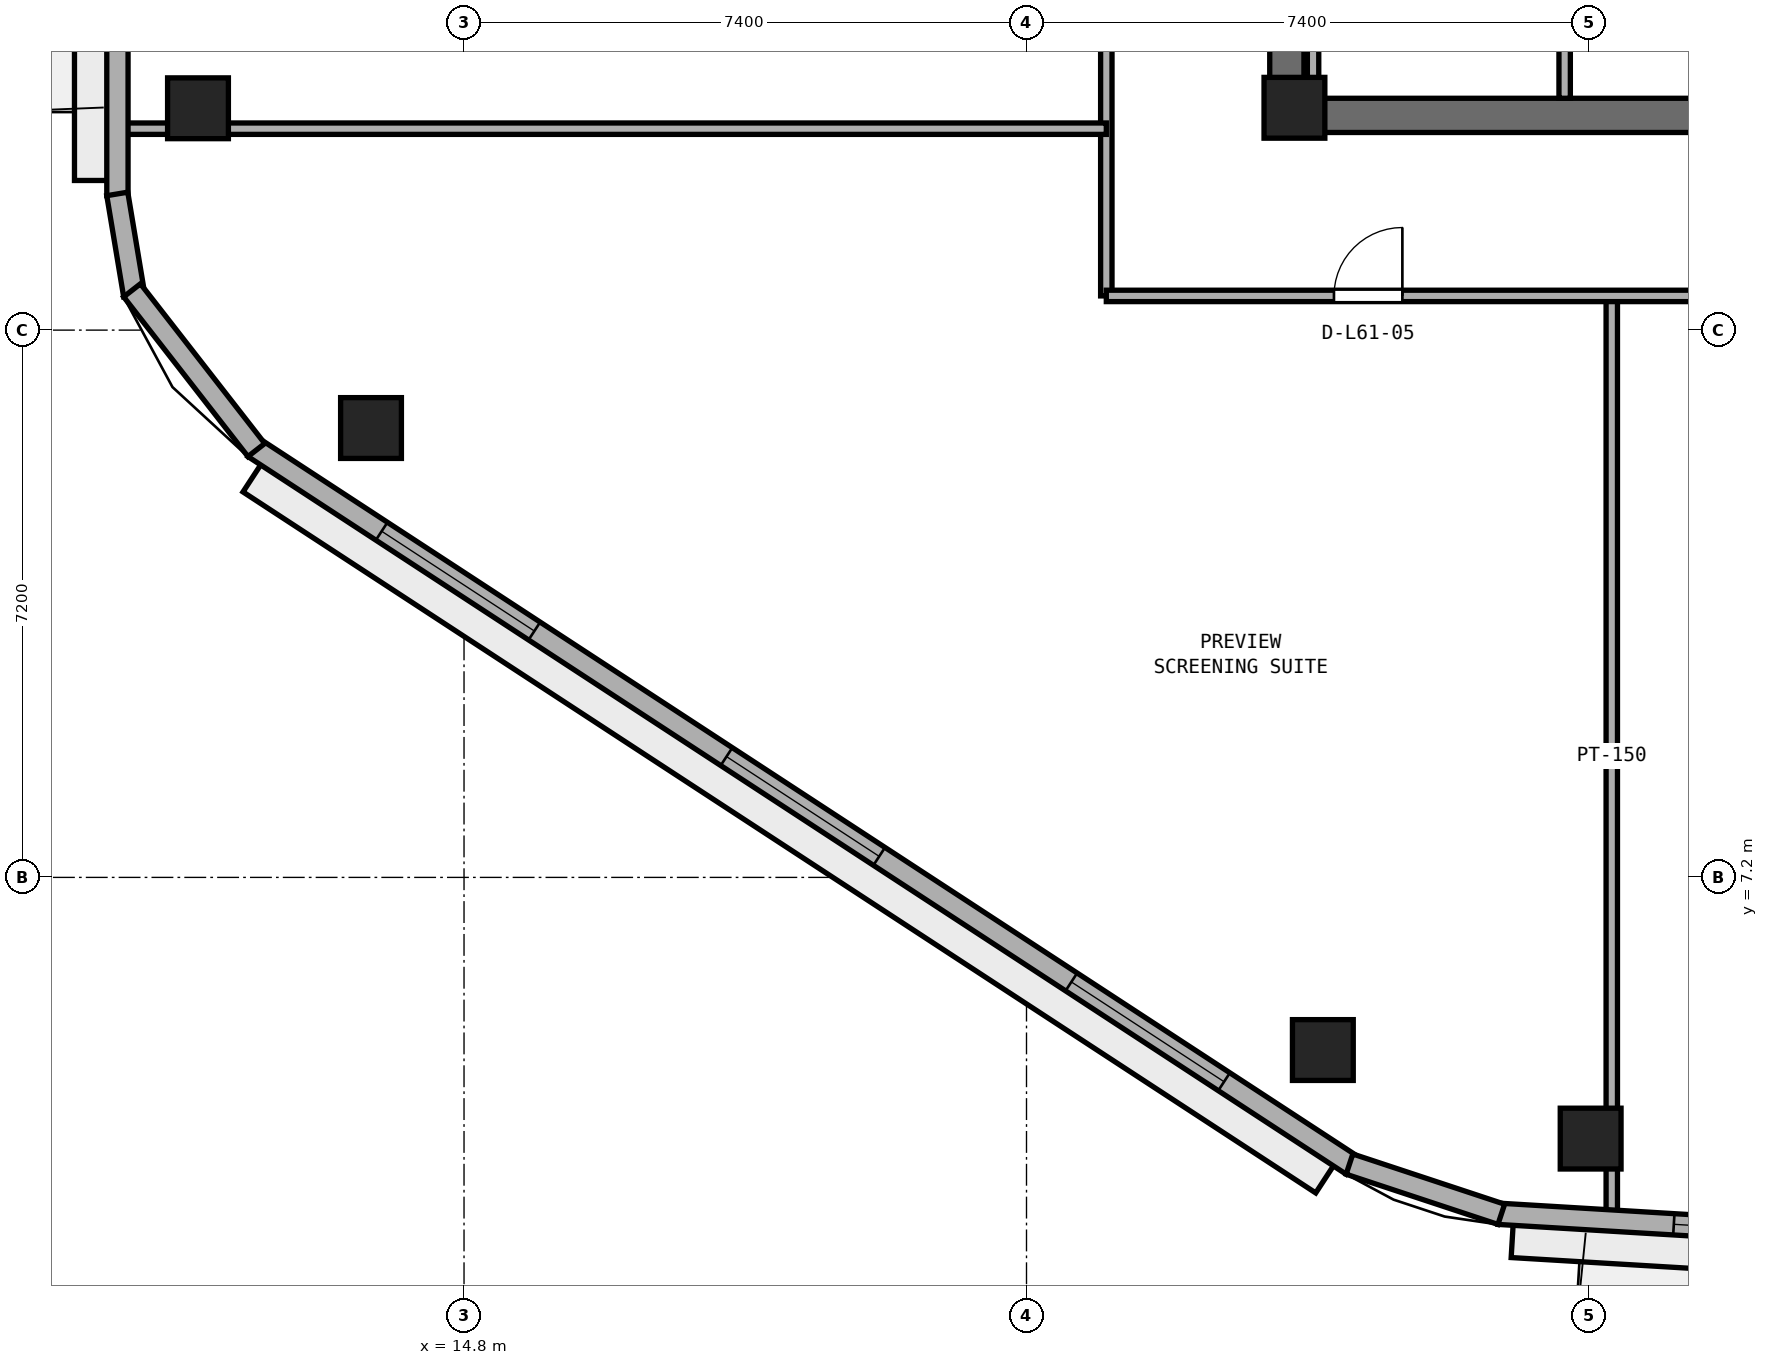
"""IFC4 building model, lengths in metres.
Left out: names, types, materials, properties, quantities, classifications, styles, units other than length and angle.
Written with IfcOpenShell. Run it as: python <this file> out.ifc"""

import sys

from ifc_helpers import new_model, si_unit, direction, frame, frame_2d, origin, origin_2d, place, context, subcontext, project, spatial, rectangle, extrude, element, fill, save


model = new_model("IFC4")
c1 = context("Model", 3, precision=1e-05, world=origin(), true_north=direction((0.0, 1.0)))
c2 = subcontext(c1, "Body", "Model", "MODEL_VIEW")
j1 = project(units=[si_unit("LENGTHUNIT", "METRE"), si_unit("PLANEANGLEUNIT", "RADIAN")], contexts=[c1])
p1 = place(None, origin())
s1 = spatial("IfcSite", under=j1, at=p1, CompositionType="ELEMENT")
p2 = place(p1, origin())
s2 = spatial("IfcBuilding", under=s1, at=p2, CompositionType="ELEMENT")
p3 = place(p2, frame((0.0, 0.0, 240.2)))
s3 = spatial("IfcBuildingStorey", under=s2, at=p3, CompositionType="ELEMENT", Elevation=240.2)
p4 = place(p3, frame((25.4, 17.225, 0.0), z_axis=(0.0, 0.0, 1.0), x_axis=(1.0, 0.0, 0.0)))
e1 = element("IfcWall", 1, at=p4, inside=s3, PredefinedType="SHEAR", context=c2, shape_type="SweptSolid", body=[
    extrude(rectangle(XDim=23.2, YDim=0.45, at=frame_2d((11.6, 0.0))), origin(), (0.0, 0.0, 1.0), 3.51),
])
p5 = place(p3, frame((25.625, 17.45, 0.0), z_axis=(0.0, 0.0, 1.0), x_axis=(0.0, 1.0, 0.0)))
e2 = element("IfcWall", 2, at=p5, inside=s3, PredefinedType="SHEAR", context=c2, shape_type="SweptSolid", body=[
    extrude(rectangle(XDim=15.5, YDim=0.45, at=frame_2d((7.75, 0.0))), origin(), (0.0, 0.0, 1.0), 3.51),
])
p6 = place(p5, frame((7.0, 0.0, 0.0)))
e3 = element("IfcOpeningElement", 3, at=p6, cuts=e2, PredefinedType="OPENING", context=c2, shape_type="SweptSolid", body=[
    extrude(rectangle(XDim=1.5, YDim=2.15, at=frame_2d((0.75, 1.075))), frame((0.0, 0.235, 0.0), z_axis=(0.0, -1.0, 0.0), x_axis=(1.0, 0.0, 0.0)), (0.0, 0.0, 1.0), 0.47),
])
p7 = place(p3, frame((25.725, 17.325, 0.0), z_axis=(0.0, 0.0, 1.0), x_axis=(1.0, 0.0, 0.0)))
e4 = element("IfcColumn", 4, at=p7, inside=s3, PredefinedType="PILASTER", context=c2, shape_type="SweptSolid", body=[
    extrude(rectangle(XDim=0.8, YDim=0.8, at=origin_2d()), origin(), (0.0, 0.0, 1.0), 3.8),
])
for number, where, z_axis, x_axis in (
    (5, (29.622, 3.764, 0.0), (0.0, 0.0, 1.0), (1.0, 0.0, 0.0)),
    (6, (11.3, 17.319, 0.0), (0.0, 0.0, 1.0), (1.0, 0.0, 0.0)),
    (7, (13.576, 13.112, 0.0), (0.0, 0.0, 1.0), (1.0, 0.0, 0.0)),
    (8, (26.099, 4.929, 0.0), (0.0, 0.0, 1.0), (1.0, 0.0, 0.0)),
):
    element("IfcColumn", number, at=place(p3, frame(where, z_axis=z_axis, x_axis=x_axis)), inside=s3, PredefinedType="COLUMN", context=c2, shape_type="SweptSolid", body=[
        extrude(rectangle(XDim=0.8, YDim=0.8, at=origin_2d()), origin(), (0.0, 0.0, 1.0), 3.8),
    ])
p8 = place(p3, frame((25.97, 17.45, 0.0), z_axis=(0.0, 0.0, 1.0), x_axis=(0.0, 1.0, 0.0)))
e9 = element("IfcWall", 9, at=p8, inside=s3, PredefinedType="PARTITIONING", context=c2, shape_type="SweptSolid", body=[
    extrude(rectangle(XDim=2.3, YDim=0.15, at=frame_2d((1.15, 0.0))), origin(), (0.0, 0.0, 1.0), 2.61),
])
p9 = place(p3, frame((29.28, 17.45, 0.0), z_axis=(0.0, 0.0, 1.0), x_axis=(0.0, 1.0, 0.0)))
e10 = element("IfcWall", 10, at=p9, inside=s3, PredefinedType="PARTITIONING", context=c2, shape_type="SweptSolid", body=[
    extrude(rectangle(XDim=2.3, YDim=0.15, at=frame_2d((1.15, 0.0))), origin(), (0.0, 0.0, 1.0), 3.51),
])
p10 = place(p3, frame((29.9, 2.75, 0.0), z_axis=(0.0, 0.0, 1.0), x_axis=(0.0, 1.0, 0.0)))
e11 = element("IfcWall", 11, at=p10, inside=s3, PredefinedType="PARTITIONING", context=c2, shape_type="SweptSolid", body=[
    extrude(rectangle(XDim=12.1, YDim=0.15, at=frame_2d((6.05, 0.0))), origin(), (0.0, 0.0, 1.0), 3.51),
])
p11 = place(p3, frame((23.25, 14.85, 0.0), z_axis=(0.0, 0.0, 1.0), x_axis=(0.0, 1.0, 0.0)))
e12 = element("IfcWall", 12, at=p11, inside=s3, PredefinedType="PARTITIONING", context=c2, shape_type="SweptSolid", body=[
    extrude(rectangle(XDim=20.7, YDim=0.15, at=frame_2d((10.35, 0.0))), origin(), (0.0, 0.0, 1.0), 3.51),
])
p12 = place(p11, frame((9.9, 0.0, 0.0)))
e13 = element("IfcOpeningElement", 13, at=p12, cuts=e12, PredefinedType="OPENING", context=c2, shape_type="SweptSolid", body=[
    extrude(rectangle(XDim=0.9, YDim=2.1, at=frame_2d((0.45, 1.05))), frame((0.0, 0.085, 0.0), z_axis=(0.0, -1.0, 0.0), x_axis=(1.0, 0.0, 0.0)), (0.0, 0.0, 1.0), 0.17),
])
p13 = place(p3, frame((23.25, 14.85, 0.0), z_axis=(0.0, 0.0, 1.0), x_axis=(1.0, 0.0, 0.0)))
e14 = element("IfcWall", 14, at=p13, inside=s3, PredefinedType="PARTITIONING", context=c2, shape_type="SweptSolid", body=[
    extrude(rectangle(XDim=25.35, YDim=0.15, at=frame_2d((12.675, 0.0))), origin(), (0.0, 0.0, 1.0), 3.51),
])
p14 = place(p13, frame((2.995, 0.0, 0.0)))
e15 = element("IfcOpeningElement", 15, at=p14, cuts=e14, PredefinedType="OPENING", context=c2, shape_type="SweptSolid", body=[
    extrude(rectangle(XDim=0.9, YDim=2.1, at=frame_2d((0.45, 1.05))), frame((0.0, 0.085, 0.0), z_axis=(0.0, -1.0, 0.0), x_axis=(1.0, 0.0, 0.0)), (0.0, 0.0, 1.0), 0.17),
])
p15 = place(p13, frame((11.95, 0.0, 0.0)))
e16 = element("IfcOpeningElement", 16, at=p15, cuts=e14, PredefinedType="OPENING", context=c2, shape_type="SweptSolid", body=[
    extrude(rectangle(XDim=0.9, YDim=2.1, at=frame_2d((0.45, 1.05))), frame((0.0, 0.085, 0.0), z_axis=(0.0, -1.0, 0.0), x_axis=(1.0, 0.0, 0.0)), (0.0, 0.0, 1.0), 0.17),
])
p16 = place(p13, frame((21.18, 0.0, 0.0)))
e17 = element("IfcOpeningElement", 17, at=p16, cuts=e14, PredefinedType="OPENING", context=c2, shape_type="SweptSolid", body=[
    extrude(rectangle(XDim=0.9, YDim=2.1, at=frame_2d((0.45, 1.05))), frame((0.0, 0.085, 0.0), z_axis=(0.0, -1.0, 0.0), x_axis=(1.0, 0.0, 0.0)), (0.0, 0.0, 1.0), 0.17),
])
p17 = place(p3, frame((10.305, 17.05, 0.0), z_axis=(0.0, 0.0, 1.0), x_axis=(1.0, 0.0, 0.0)))
e18 = element("IfcWall", 18, at=p17, inside=s3, PredefinedType="PARTITIONING", context=c2, shape_type="SweptSolid", body=[
    extrude(rectangle(XDim=12.945, YDim=0.15, at=frame_2d((6.473, 0.0))), origin(), (0.0, 0.0, 1.0), 3.51),
])
p18 = place(p3, frame((28.411, 2.774, 0.0), z_axis=(0.0, 0.0, 1.0), x_axis=(0.998203068368, -0.059921901676, 0.0)))
e19 = element("IfcWall", 19, at=p18, inside=s3, PredefinedType="STANDARD", context=c2, shape_type="SweptSolid", body=[
    extrude(rectangle(XDim=19.06, YDim=0.28, at=frame_2d((9.53, 0.0))), origin(), (0.0, 0.0, 1.0), 3.51),
])
p19 = place(p18, frame((8.98, 0.0, 0.0)))
e20 = element("IfcOpeningElement", 20, at=p19, cuts=e19, PredefinedType="OPENING", context=c2, shape_type="SweptSolid", body=[
    extrude(rectangle(XDim=1.1, YDim=2.2, at=frame_2d((0.55, 1.1))), frame((0.0, 0.15, 0.0), z_axis=(0.0, -1.0, 0.0), x_axis=(1.0, 0.0, 0.0)), (0.0, 0.0, 1.0), 0.3),
])
p20 = place(p18, frame((2.31, 0.0, 0.9)))
e21 = element("IfcOpeningElement", 21, at=p20, cuts=e19, PredefinedType="OPENING", context=c2, shape_type="SweptSolid", body=[
    extrude(rectangle(XDim=2.4, YDim=1.75, at=frame_2d((1.2, 0.875))), frame((0.0, 0.15, 0.0), z_axis=(0.0, -1.0, 0.0), x_axis=(1.0, 0.0, 0.0)), (0.0, 0.0, 1.0), 0.3),
])
p21 = place(p18, frame((14.35, 0.0, 0.9)))
e22 = element("IfcOpeningElement", 22, at=p21, cuts=e19, PredefinedType="OPENING", context=c2, shape_type="SweptSolid", body=[
    extrude(rectangle(XDim=2.4, YDim=1.75, at=frame_2d((1.2, 0.875))), frame((0.0, 0.15, 0.0), z_axis=(0.0, -1.0, 0.0), x_axis=(1.0, 0.0, 0.0)), (0.0, 0.0, 1.0), 0.3),
])
p22 = place(p3, frame((10.24, 33.425, 0.0), z_axis=(0.0, 0.0, 1.0), x_axis=(0.0, -1.0, 0.0)))
e23 = element("IfcWall", 23, at=p22, inside=s3, PredefinedType="STANDARD", context=c2, shape_type="SweptSolid", body=[
    extrude(rectangle(XDim=17.257, YDim=0.28, at=frame_2d((8.628, 0.0))), origin(), (0.0, 0.0, 1.0), 3.51),
])
p23 = place(p22, frame((8.078, 0.0, 0.0)))
e24 = element("IfcOpeningElement", 24, at=p23, cuts=e23, PredefinedType="OPENING", context=c2, shape_type="SweptSolid", body=[
    extrude(rectangle(XDim=1.1, YDim=2.2, at=frame_2d((0.55, 1.1))), frame((0.0, 0.15, 0.0), z_axis=(0.0, -1.0, 0.0), x_axis=(1.0, 0.0, 0.0)), (0.0, 0.0, 1.0), 0.3),
])
p24 = place(p22, frame((2.01, 0.0, 0.9)))
e25 = element("IfcOpeningElement", 25, at=p24, cuts=e23, PredefinedType="OPENING", context=c2, shape_type="SweptSolid", body=[
    extrude(rectangle(XDim=2.4, YDim=1.75, at=frame_2d((1.2, 0.875))), frame((0.0, 0.15, 0.0), z_axis=(0.0, -1.0, 0.0), x_axis=(1.0, 0.0, 0.0)), (0.0, 0.0, 1.0), 0.3),
])
p25 = place(p22, frame((12.847, 0.0, 0.9)))
e26 = element("IfcOpeningElement", 26, at=p25, cuts=e23, PredefinedType="OPENING", context=c2, shape_type="SweptSolid", body=[
    extrude(rectangle(XDim=2.4, YDim=1.75, at=frame_2d((1.2, 0.875))), frame((0.0, 0.15, 0.0), z_axis=(0.0, -1.0, 0.0), x_axis=(1.0, 0.0, 0.0)), (0.0, 0.0, 1.0), 0.3),
])
p26 = place(p3, frame((12.034, 12.854, 0.0), z_axis=(0.0, 0.0, 1.0), x_axis=(0.837118352984, -0.547021812269, 0.0)))
e27 = element("IfcWall", 27, at=p26, inside=s3, PredefinedType="STANDARD", context=c2, shape_type="SweptSolid", body=[
    extrude(rectangle(XDim=17.259, YDim=0.28, at=frame_2d((8.63, 0.0))), origin(), (0.0, 0.0, 1.0), 3.51),
])
p27 = place(p26, frame((2.01, 0.0, 0.9)))
e28 = element("IfcOpeningElement", 28, at=p27, cuts=e27, PredefinedType="OPENING", context=c2, shape_type="SweptSolid", body=[
    extrude(rectangle(XDim=2.4, YDim=1.75, at=frame_2d((1.2, 0.875))), frame((0.0, 0.15, 0.0), z_axis=(0.0, -1.0, 0.0), x_axis=(1.0, 0.0, 0.0)), (0.0, 0.0, 1.0), 0.3),
])
p28 = place(p26, frame((7.43, 0.0, 0.9)))
e29 = element("IfcOpeningElement", 29, at=p28, cuts=e27, PredefinedType="OPENING", context=c2, shape_type="SweptSolid", body=[
    extrude(rectangle(XDim=2.4, YDim=1.75, at=frame_2d((1.2, 0.875))), frame((0.0, 0.15, 0.0), z_axis=(0.0, -1.0, 0.0), x_axis=(1.0, 0.0, 0.0)), (0.0, 0.0, 1.0), 0.3),
])
p29 = place(p26, frame((12.849, 0.0, 0.9)))
e30 = element("IfcOpeningElement", 30, at=p29, cuts=e27, PredefinedType="OPENING", context=c2, shape_type="SweptSolid", body=[
    extrude(rectangle(XDim=2.4, YDim=1.75, at=frame_2d((1.2, 0.875))), frame((0.0, 0.15, 0.0), z_axis=(0.0, -1.0, 0.0), x_axis=(1.0, 0.0, 0.0)), (0.0, 0.0, 1.0), 0.3),
])
p30 = place(p3, frame((10.238, 16.192, 0.0), z_axis=(0.0, 0.0, 1.0), x_axis=(0.164604311367, -0.986359681191, 0.0)))
e31 = element("IfcWall", 31, at=p30, inside=s3, PredefinedType="STANDARD", context=c2, shape_type="SweptSolid", body=[
    extrude(rectangle(XDim=1.35, YDim=0.28, at=frame_2d((0.675, 0.0))), origin(), (0.0, 0.0, 1.0), 3.51),
])
p31 = place(p3, frame((10.433, 14.923, 0.0), z_axis=(0.0, 0.0, 1.0), x_axis=(0.614181852676, -0.78916452774, 0.0)))
e32 = element("IfcWall", 32, at=p31, inside=s3, PredefinedType="STANDARD", context=c2, shape_type="SweptSolid", body=[
    extrude(rectangle(XDim=2.662, YDim=0.28, at=frame_2d((1.331, 0.0))), origin(), (0.0, 0.0, 1.0), 3.51),
])
p32 = place(p3, frame((26.449, 3.428, 0.0), z_axis=(0.0, 0.0, 1.0), x_axis=(0.949435039229, -0.313963542923, 0.0)))
e33 = element("IfcWall", 33, at=p32, inside=s3, PredefinedType="STANDARD", context=c2, shape_type="SweptSolid", body=[
    extrude(rectangle(XDim=2.104, YDim=0.28, at=frame_2d((1.052, 0.0))), origin(), (0.0, 0.0, 1.0), 3.51),
])
p33 = place(p14, origin())
e34 = element("IfcDoor", 34, at=p33, inside=s3, OperationType="SINGLE_SWING_RIGHT", PredefinedType="DOOR", context=c2, shape_type="SweptSolid", body=[
    extrude(rectangle(XDim=0.9, YDim=2.1, at=frame_2d((0.45, 1.05))), frame((0.0, 0.025, 0.0), z_axis=(0.0, -1.0, 0.0), x_axis=(1.0, 0.0, 0.0)), (0.0, 0.0, 1.0), 0.05),
])
fill(e15, e34)
p34 = place(p20, origin())
e35 = element("IfcWindow", 35, at=p34, inside=s3, PartitioningType="SINGLE_PANEL", PredefinedType="WINDOW", context=c2, shape_type="SweptSolid", body=[
    extrude(rectangle(XDim=2.4, YDim=1.75, at=frame_2d((1.2, 0.875))), frame((0.0, 0.03, 0.0), z_axis=(0.0, -1.0, 0.0), x_axis=(1.0, 0.0, 0.0)), (0.0, 0.0, 1.0), 0.06),
])
fill(e21, e35)
p35 = place(p27, origin())
e36 = element("IfcWindow", 36, at=p35, inside=s3, PartitioningType="SINGLE_PANEL", PredefinedType="WINDOW", context=c2, shape_type="SweptSolid", body=[
    extrude(rectangle(XDim=2.4, YDim=1.75, at=frame_2d((1.2, 0.875))), frame((0.0, 0.03, 0.0), z_axis=(0.0, -1.0, 0.0), x_axis=(1.0, 0.0, 0.0)), (0.0, 0.0, 1.0), 0.06),
])
fill(e28, e36)
p36 = place(p28, origin())
e37 = element("IfcWindow", 37, at=p36, inside=s3, PartitioningType="SINGLE_PANEL", PredefinedType="WINDOW", context=c2, shape_type="SweptSolid", body=[
    extrude(rectangle(XDim=2.4, YDim=1.75, at=frame_2d((1.2, 0.875))), frame((0.0, 0.03, 0.0), z_axis=(0.0, -1.0, 0.0), x_axis=(1.0, 0.0, 0.0)), (0.0, 0.0, 1.0), 0.06),
])
fill(e29, e37)
p37 = place(p29, origin())
e38 = element("IfcWindow", 38, at=p37, inside=s3, PartitioningType="SINGLE_PANEL", PredefinedType="WINDOW", context=c2, shape_type="SweptSolid", body=[
    extrude(rectangle(XDim=2.4, YDim=1.75, at=frame_2d((1.2, 0.875))), frame((0.0, 0.03, 0.0), z_axis=(0.0, -1.0, 0.0), x_axis=(1.0, 0.0, 0.0)), (0.0, 0.0, 1.0), 0.06),
])
fill(e30, e38)
save(model, sys.argv[1])
